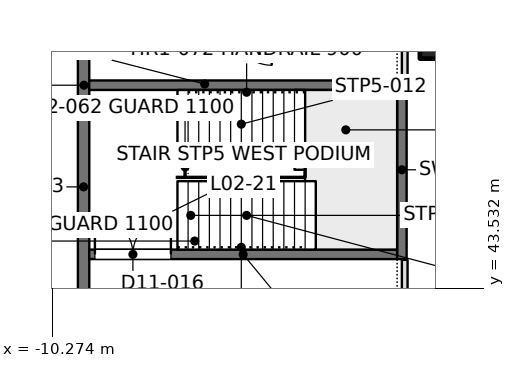
"""IFC4 building model, lengths in metres.
Left out: names, types, materials, properties, quantities, classifications, styles, units other than length and angle.
Written with IfcOpenShell. Run it as: python <this file> out.ifc"""

import sys

from ifc_helpers import new_model, si_unit, direction, frame, frame_2d, origin, origin_2d, place, context, subcontext, project, spatial, rectangle, extrude, element, fill, save


model = new_model("IFC4")
c1 = context("Model", 3, precision=1e-05, world=origin(), true_north=direction((0.0, 1.0)))
c2 = subcontext(c1, "Body", "Model", "MODEL_VIEW")
j1 = project(units=[si_unit("LENGTHUNIT", "METRE"), si_unit("PLANEANGLEUNIT", "RADIAN")], contexts=[c1])
p1 = place(None, origin())
s1 = spatial("IfcSite", under=j1, at=p1, CompositionType="ELEMENT")
p2 = place(p1, origin())
s2 = spatial("IfcBuilding", under=s1, at=p2, CompositionType="ELEMENT")
p3 = place(p2, frame((0.0, 0.0, 9.9)))
s3 = spatial("IfcBuildingStorey", under=s2, at=p3, CompositionType="ELEMENT", Elevation=9.9)
p4 = place(p3, frame((0.0, 50.4, 0.0), z_axis=(0.0, 0.0, 1.0), x_axis=(1.0, 0.0, 0.0)))
e1 = element("IfcColumn", 1, at=p4, inside=s3, PredefinedType="COLUMN", context=c2, shape_type="SweptSolid", body=[
    extrude(rectangle(XDim=1.2, YDim=1.65, at=origin_2d()), origin(), (0.0, 0.0, 1.0), 4.5),
])
p5 = place(p3, frame((-9.45, 42.0, 0.0), z_axis=(0.0, 0.0, 1.0), x_axis=(0.0, 1.0, 0.0)))
e2 = element("IfcWall", 2, at=p5, inside=s3, PredefinedType="SOLIDWALL", context=c2, shape_type="SweptSolid", body=[
    extrude(rectangle(XDim=8.4, YDim=0.3, at=frame_2d((4.2, 0.0))), origin(), (0.0, 0.0, 1.0), 4.3),
])
p6 = place(p3, frame((-1.0, 37.8, 0.0), z_axis=(0.0, 0.0, 1.0), x_axis=(0.0, 1.0, 0.0)))
e3 = element("IfcWall", 3, at=p6, inside=s3, PredefinedType="PARTITIONING", context=c2, shape_type="SweptSolid", body=[
    extrude(rectangle(XDim=6.48, YDim=0.15, at=frame_2d((3.24, 0.0))), origin(), (0.0, 0.0, 1.0), 3.65),
])
p7 = place(p6, frame((1.6, 0.0, 0.0)))
e4 = element("IfcOpeningElement", 4, at=p7, cuts=e3, PredefinedType="OPENING", context=c2, shape_type="SweptSolid", body=[
    extrude(rectangle(XDim=1.0, YDim=2.2, at=frame_2d((0.5, 1.1))), frame((0.0, 0.085, 0.0), z_axis=(0.0, -1.0, 0.0), x_axis=(1.0, 0.0, 0.0)), (0.0, 0.0, 1.0), 0.17),
])
p8 = place(p3, frame((-1.0, 49.02, 0.0), z_axis=(0.0, 0.0, 1.0), x_axis=(0.0, 1.0, 0.0)))
e5 = element("IfcWall", 5, at=p8, inside=s3, PredefinedType="PARTITIONING", context=c2, shape_type="SweptSolid", body=[
    extrude(rectangle(XDim=2.38, YDim=0.15, at=frame_2d((1.19, 0.0))), origin(), (0.0, 0.0, 1.0), 3.65),
])
p9 = place(p3, frame((-9.302, 44.425, 0.0), z_axis=(0.0, 0.0, 1.0), x_axis=(1.0, 0.0, 0.0)))
e6 = element("IfcWall", 6, at=p9, inside=s3, PredefinedType="SOLIDWALL", context=c2, shape_type="SweptSolid", body=[
    extrude(rectangle(XDim=8.102, YDim=0.25, at=frame_2d((4.051, 0.0))), origin(), (0.0, 0.0, 1.0), 4.5),
])
p10 = place(p9, frame((0.15, 0.0, 0.0)))
e7 = element("IfcOpeningElement", 7, at=p10, cuts=e6, PredefinedType="OPENING", context=c2, shape_type="SweptSolid", body=[
    extrude(rectangle(XDim=2.0, YDim=2.2, at=frame_2d((1.0, 1.1))), frame((0.0, 0.135, 0.0), z_axis=(0.0, -1.0, 0.0), x_axis=(1.0, 0.0, 0.0)), (0.0, 0.0, 1.0), 0.27),
])
p11 = place(p3, frame((-9.302, 48.875, 0.0), z_axis=(0.0, 0.0, 1.0), x_axis=(1.0, 0.0, 0.0)))
e8 = element("IfcWall", 8, at=p11, inside=s3, PredefinedType="SOLIDWALL", context=c2, shape_type="SweptSolid", body=[
    extrude(rectangle(XDim=8.102, YDim=0.25, at=frame_2d((4.051, 0.0))), origin(), (0.0, 0.0, 1.0), 4.5),
])
p12 = place(p3, frame((-1.075, 44.3, 0.0), z_axis=(0.0, 0.0, 1.0), x_axis=(0.0, 1.0, 0.0)))
e9 = element("IfcWall", 9, at=p12, inside=s3, PredefinedType="SOLIDWALL", context=c2, shape_type="SweptSolid", body=[
    extrude(rectangle(XDim=4.7, YDim=0.25, at=frame_2d((2.35, 0.0))), origin(), (0.0, 0.0, 1.0), 4.5),
])
p13 = place(p10, origin())
e10 = element("IfcDoor", 10, at=p13, inside=s3, OperationType="DOUBLE_DOOR_SINGLE_SWING", PredefinedType="DOOR", context=c2, shape_type="SweptSolid", body=[
    extrude(rectangle(XDim=2.0, YDim=2.2, at=frame_2d((1.0, 1.1))), frame((0.0, 0.025, 0.0), z_axis=(0.0, -1.0, 0.0), x_axis=(1.0, 0.0, 0.0)), (0.0, 0.0, 1.0), 0.05),
])
fill(e7, e10)
save(model, sys.argv[1])
